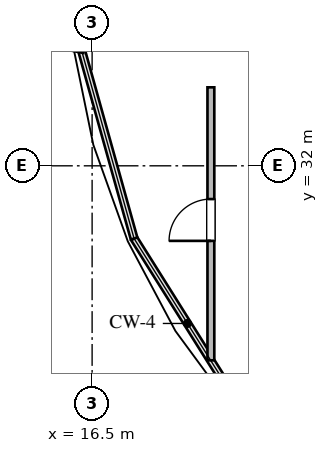
"""IFC4 building model, lengths in metres.
Left out: names, types, materials, properties, quantities, classifications, styles, units other than length and angle.
Written with IfcOpenShell. Run it as: python <this file> out.ifc"""

import sys

from ifc_helpers import new_model, si_unit, direction, frame, frame_2d, origin, place, context, subcontext, project, spatial, rectangle, extrude, element, fill, save


model = new_model("IFC4")
c1 = context("Model", 3, precision=1e-05, world=origin(), true_north=direction((0.0, 1.0)))
c2 = subcontext(c1, "Body", "Model", "MODEL_VIEW")
j1 = project(units=[si_unit("LENGTHUNIT", "METRE"), si_unit("PLANEANGLEUNIT", "RADIAN")], contexts=[c1])
p1 = place(None, origin())
s1 = spatial("IfcSite", under=j1, at=p1, CompositionType="ELEMENT")
p2 = place(p1, origin())
s2 = spatial("IfcBuilding", under=s1, at=p2, CompositionType="ELEMENT")
p3 = place(p2, frame((0.0, 0.0, 289.0)))
s3 = spatial("IfcBuildingStorey", under=s2, at=p3, CompositionType="ELEMENT", Elevation=289.0)
p4 = place(p3, frame((16.111, 34.999, 0.0), z_axis=(0.0, 0.0, 1.0), x_axis=(0.196720235208, 0.980459662128, 0.0)))
e1 = element("IfcWall", 1, at=p4, inside=s3, PredefinedType="STANDARD", context=c2, shape_type="SweptSolid", body=[
    extrude(rectangle(XDim=14.299, YDim=0.32, at=frame_2d((7.15, 0.0))), origin(), (0.0, 0.0, 1.0), 3.48),
])
p5 = place(p3, frame((19.625, 26.881, 0.0), z_axis=(0.0, 0.0, 1.0), x_axis=(0.0, 1.0, 0.0)))
e2 = element("IfcWall", 2, at=p5, inside=s3, PredefinedType="PARTITIONING", context=c2, shape_type="SweptSolid", body=[
    extrude(rectangle(XDim=7.184, YDim=0.18, at=frame_2d((3.592, 0.0))), origin(), (0.0, 0.0, 1.0), 2.937),
])
p6 = place(p5, frame((3.144, 0.0, 0.0)))
e3 = element("IfcOpeningElement", 3, at=p6, cuts=e2, PredefinedType="OPENING", context=c2, shape_type="SweptSolid", body=[
    extrude(rectangle(XDim=1.1, YDim=2.1, at=frame_2d((0.55, 1.05))), frame((0.0, 0.1, 0.0), z_axis=(0.0, -1.0, 0.0), x_axis=(1.0, 0.0, 0.0)), (0.0, 0.0, 1.0), 0.2),
])
p7 = place(p6, origin())
e4 = element("IfcDoor", 4, at=p7, inside=s3, OperationType="SINGLE_SWING_LEFT", PredefinedType="DOOR", context=c2, shape_type="SweptSolid", body=[
    extrude(rectangle(XDim=1.1, YDim=2.1, at=frame_2d((0.55, 1.05))), frame((0.0, 0.025, 0.0), z_axis=(0.0, -1.0, 0.0), x_axis=(1.0, 0.0, 0.0)), (0.0, 0.0, 1.0), 0.05),
])
fill(e3, e4)
save(model, sys.argv[1])
